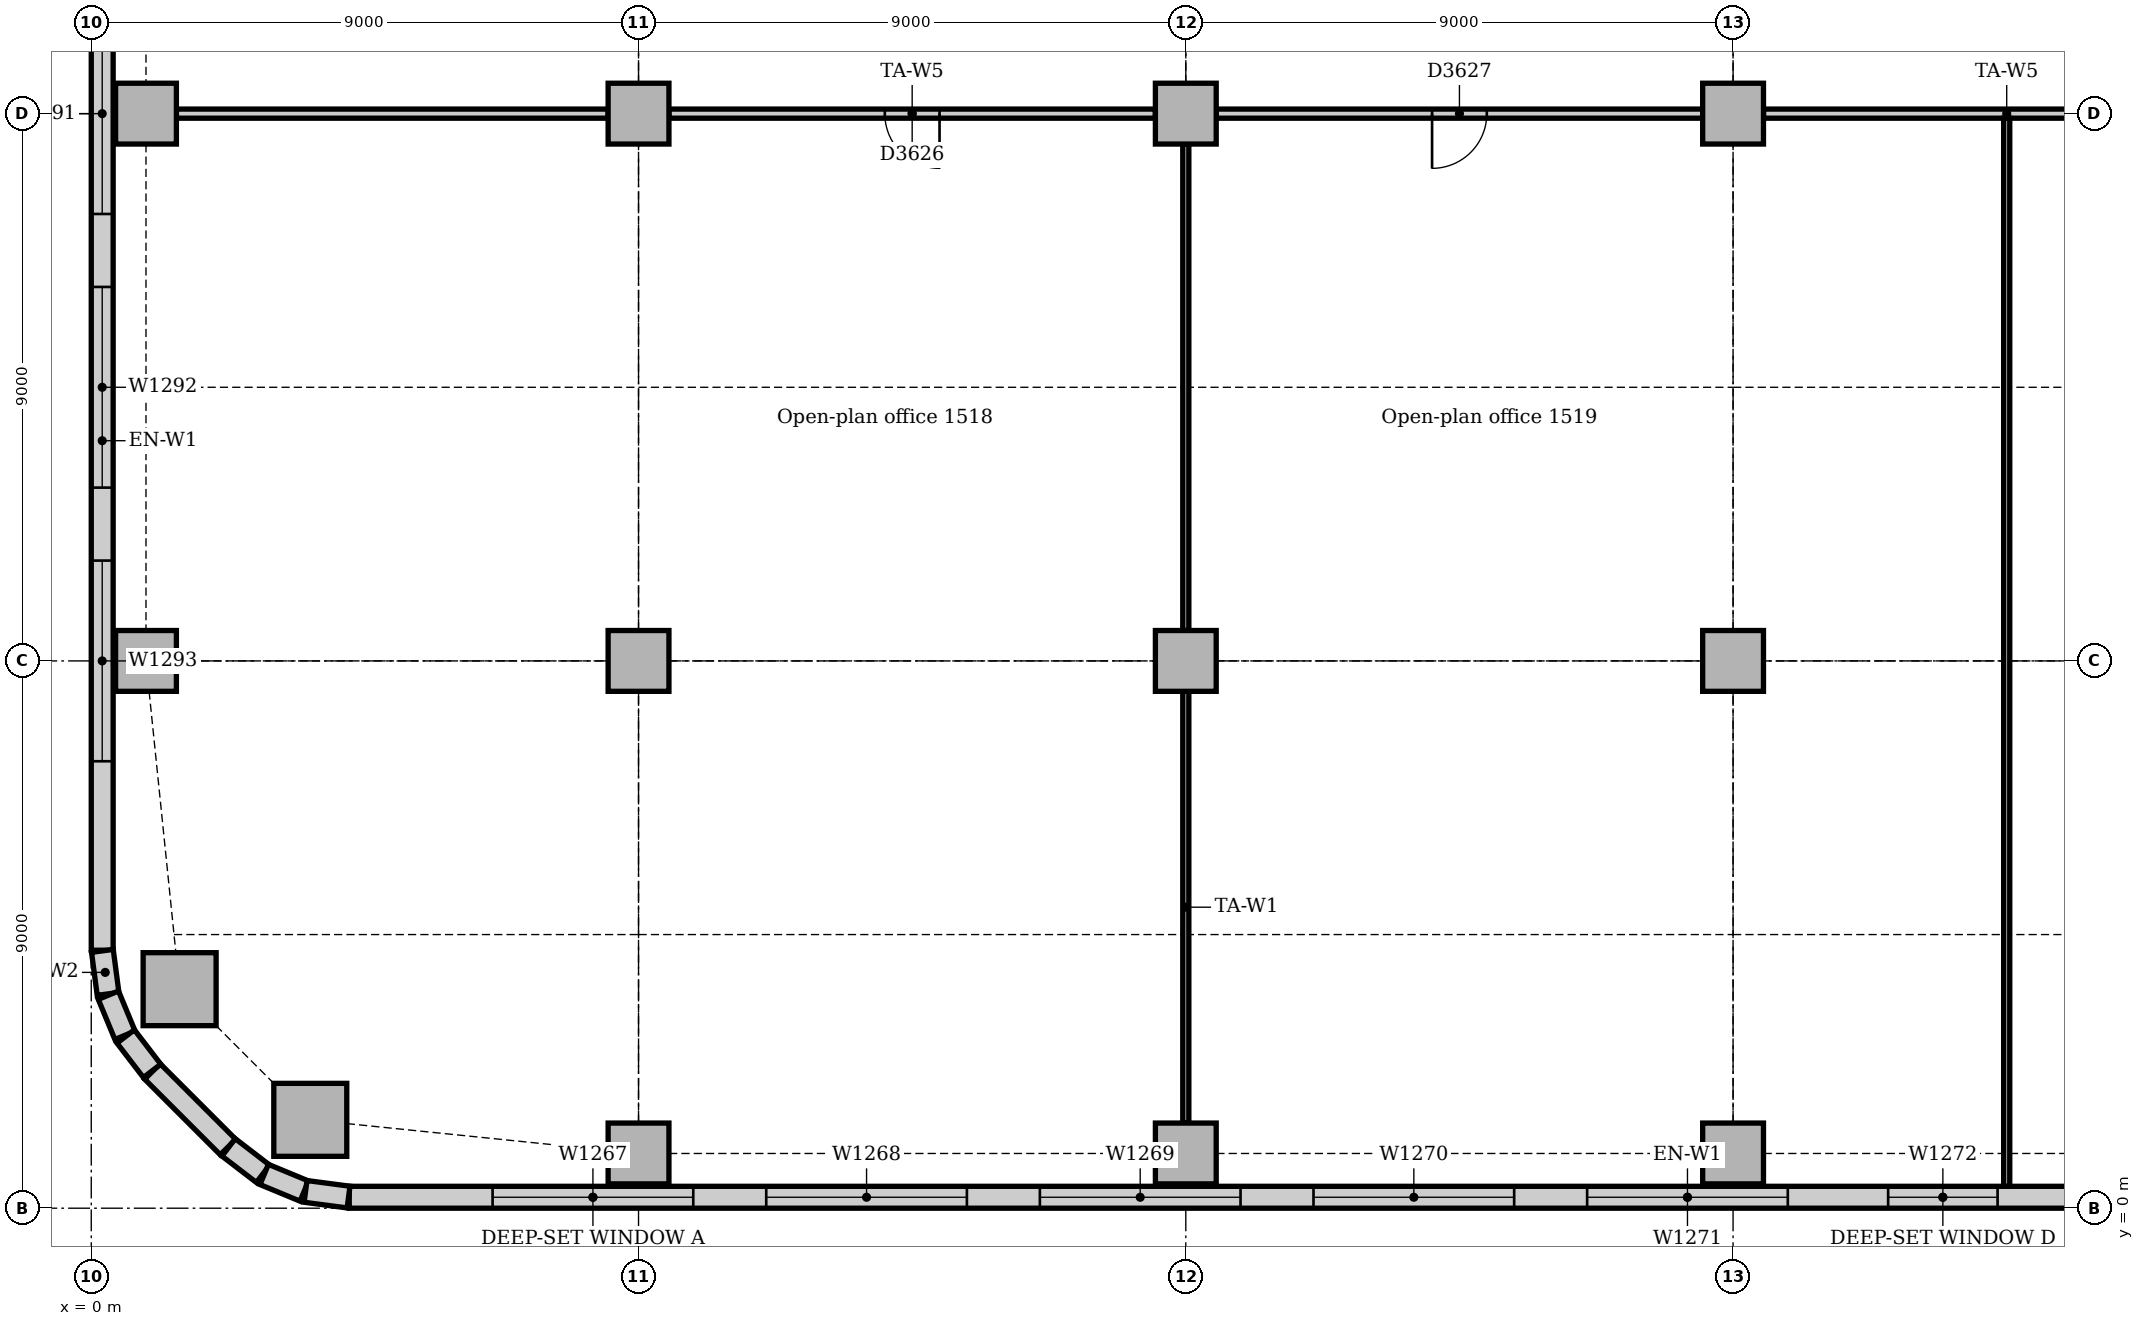
"""IFC4 building model, lengths in metres.
Left out: names, types, materials, properties, quantities, classifications, styles, units other than length and angle.
Written with IfcOpenShell. Run it as: python <this file> out.ifc"""

import sys

from ifc_helpers import new_model, si_unit, direction, frame, frame_2d, origin, origin_2d, place, context, subcontext, project, spatial, rectangle, extrude, element, fill, save


model = new_model("IFC4")
c1 = context("Model", 3, precision=1e-05, world=origin(), true_north=direction((0.0, 1.0)))
c2 = subcontext(c1, "Body", "Model", "MODEL_VIEW")
j1 = project(units=[si_unit("LENGTHUNIT", "METRE"), si_unit("PLANEANGLEUNIT", "RADIAN")], contexts=[c1])
p1 = place(None, origin())
s1 = spatial("IfcSite", under=j1, at=p1, CompositionType="ELEMENT")
p2 = place(p1, origin())
s2 = spatial("IfcBuilding", under=s1, at=p2, CompositionType="ELEMENT")
p3 = place(p2, frame((0.0, 0.0, 67.0)))
s3 = spatial("IfcBuildingStorey", under=s2, at=p3, CompositionType="ELEMENT", Elevation=67.0)
for number, where, z_axis, x_axis in (
    (1, (3.602, 1.453, 0.0), (0.0, 0.0, 1.0), (1.0, 0.0, 0.0)),
    (2, (1.453, 3.602, 0.0), (0.0, 0.0, 1.0), (1.0, 0.0, 0.0)),
):
    element("IfcColumn", number, at=place(p3, frame(where, z_axis=z_axis, x_axis=x_axis)), inside=s3, PredefinedType="COLUMN", context=c2, shape_type="SweptSolid", body=[
        extrude(rectangle(XDim=1.2, YDim=1.2, at=origin_2d()), origin(), (0.0, 0.0, 1.0), 3.85),
    ])
for number, where, z_axis, x_axis in (
    (3, (9.0, 0.9, 0.0), (0.0, 0.0, 1.0), (1.0, 0.0, 0.0)),
    (4, (18.0, 0.9, 0.0), (0.0, 0.0, 1.0), (1.0, 0.0, 0.0)),
    (5, (27.0, 0.9, 0.0), (0.0, 0.0, 1.0), (1.0, 0.0, 0.0)),
    (6, (0.9, 9.0, 0.0), (0.0, 0.0, 1.0), (1.0, 0.0, 0.0)),
    (7, (0.9, 18.0, 0.0), (0.0, 0.0, 1.0), (1.0, 0.0, 0.0)),
    (8, (9.0, 9.0, 0.0), (0.0, 0.0, 1.0), (1.0, 0.0, 0.0)),
    (9, (9.0, 18.0, 0.0), (0.0, 0.0, 1.0), (1.0, 0.0, 0.0)),
    (10, (18.0, 9.0, 0.0), (0.0, 0.0, 1.0), (1.0, 0.0, 0.0)),
    (11, (18.0, 18.0, 0.0), (0.0, 0.0, 1.0), (1.0, 0.0, 0.0)),
    (12, (27.0, 9.0, 0.0), (0.0, 0.0, 1.0), (1.0, 0.0, 0.0)),
    (13, (27.0, 18.0, 0.0), (0.0, 0.0, 1.0), (1.0, 0.0, 0.0)),
):
    element("IfcColumn", number, at=place(p3, frame(where, z_axis=z_axis, x_axis=x_axis)), inside=s3, PredefinedType="COLUMN", context=c2, shape_type="SweptSolid", body=[
        extrude(rectangle(XDim=1.0, YDim=1.0, at=origin_2d()), origin(), (0.0, 0.0, 1.0), 3.85),
    ])
p4 = place(p3, frame((4.243, 0.18, 0.0), z_axis=(0.0, 0.0, 1.0), x_axis=(1.0, 0.0, 0.0)))
e14 = element("IfcWall", 14, at=p4, inside=s3, PredefinedType="STANDARD", context=c2, shape_type="SweptSolid", body=[
    extrude(rectangle(XDim=44.015, YDim=0.36, at=frame_2d((22.007, 0.0))), origin(), (0.0, 0.0, 1.0), 3.85),
])
p5 = place(p4, frame((2.357, 0.0, 0.9)))
e15 = element("IfcOpeningElement", 15, at=p5, cuts=e14, PredefinedType="OPENING", context=c2, shape_type="SweptSolid", body=[
    extrude(rectangle(XDim=3.3, YDim=1.6, at=frame_2d((1.65, 0.8))), frame((0.0, 0.19, 0.0), z_axis=(0.0, -1.0, 0.0), x_axis=(1.0, 0.0, 0.0)), (0.0, 0.0, 1.0), 0.38),
])
p6 = place(p4, frame((6.857, 0.0, 0.9)))
e16 = element("IfcOpeningElement", 16, at=p6, cuts=e14, PredefinedType="OPENING", context=c2, shape_type="SweptSolid", body=[
    extrude(rectangle(XDim=3.3, YDim=1.6, at=frame_2d((1.65, 0.8))), frame((0.0, 0.19, 0.0), z_axis=(0.0, -1.0, 0.0), x_axis=(1.0, 0.0, 0.0)), (0.0, 0.0, 1.0), 0.38),
])
p7 = place(p4, frame((11.357, 0.0, 0.9)))
e17 = element("IfcOpeningElement", 17, at=p7, cuts=e14, PredefinedType="OPENING", context=c2, shape_type="SweptSolid", body=[
    extrude(rectangle(XDim=3.3, YDim=1.6, at=frame_2d((1.65, 0.8))), frame((0.0, 0.19, 0.0), z_axis=(0.0, -1.0, 0.0), x_axis=(1.0, 0.0, 0.0)), (0.0, 0.0, 1.0), 0.38),
])
p8 = place(p4, frame((15.857, 0.0, 0.9)))
e18 = element("IfcOpeningElement", 18, at=p8, cuts=e14, PredefinedType="OPENING", context=c2, shape_type="SweptSolid", body=[
    extrude(rectangle(XDim=3.3, YDim=1.6, at=frame_2d((1.65, 0.8))), frame((0.0, 0.19, 0.0), z_axis=(0.0, -1.0, 0.0), x_axis=(1.0, 0.0, 0.0)), (0.0, 0.0, 1.0), 0.38),
])
p9 = place(p4, frame((20.357, 0.0, 0.9)))
e19 = element("IfcOpeningElement", 19, at=p9, cuts=e14, PredefinedType="OPENING", context=c2, shape_type="SweptSolid", body=[
    extrude(rectangle(XDim=3.3, YDim=1.6, at=frame_2d((1.65, 0.8))), frame((0.0, 0.19, 0.0), z_axis=(0.0, -1.0, 0.0), x_axis=(1.0, 0.0, 0.0)), (0.0, 0.0, 1.0), 0.38),
])
p10 = place(p4, frame((25.307, 0.0, 0.9)))
e20 = element("IfcOpeningElement", 20, at=p10, cuts=e14, PredefinedType="OPENING", context=c2, shape_type="SweptSolid", body=[
    extrude(rectangle(XDim=1.8, YDim=1.6, at=frame_2d((0.9, 0.8))), frame((0.0, 0.19, 0.0), z_axis=(0.0, -1.0, 0.0), x_axis=(1.0, 0.0, 0.0)), (0.0, 0.0, 1.0), 0.38),
])
p11 = place(p4, frame((29.357, 0.0, 0.9)))
e21 = element("IfcOpeningElement", 21, at=p11, cuts=e14, PredefinedType="OPENING", context=c2, shape_type="SweptSolid", body=[
    extrude(rectangle(XDim=3.3, YDim=1.6, at=frame_2d((1.65, 0.8))), frame((0.0, 0.19, 0.0), z_axis=(0.0, -1.0, 0.0), x_axis=(1.0, 0.0, 0.0)), (0.0, 0.0, 1.0), 0.38),
])
p12 = place(p4, frame((33.857, 0.0, 0.9)))
e22 = element("IfcOpeningElement", 22, at=p12, cuts=e14, PredefinedType="OPENING", context=c2, shape_type="SweptSolid", body=[
    extrude(rectangle(XDim=3.3, YDim=1.6, at=frame_2d((1.65, 0.8))), frame((0.0, 0.19, 0.0), z_axis=(0.0, -1.0, 0.0), x_axis=(1.0, 0.0, 0.0)), (0.0, 0.0, 1.0), 0.38),
])
p13 = place(p4, frame((38.357, 0.0, 0.9)))
e23 = element("IfcOpeningElement", 23, at=p13, cuts=e14, PredefinedType="OPENING", context=c2, shape_type="SweptSolid", body=[
    extrude(rectangle(XDim=3.3, YDim=1.6, at=frame_2d((1.65, 0.8))), frame((0.0, 0.19, 0.0), z_axis=(0.0, -1.0, 0.0), x_axis=(1.0, 0.0, 0.0)), (0.0, 0.0, 1.0), 0.38),
])
p14 = place(p3, frame((0.18, 21.0, 0.0), z_axis=(0.0, 0.0, 1.0), x_axis=(0.0, -1.0, 0.0)))
e24 = element("IfcWall", 24, at=p14, inside=s3, PredefinedType="STANDARD", context=c2, shape_type="SweptSolid", body=[
    extrude(rectangle(XDim=16.757, YDim=0.36, at=frame_2d((8.379, 0.0))), origin(), (0.0, 0.0, 1.0), 3.85),
])
p15 = place(p14, frame((1.35, 0.0, 0.9)))
e25 = element("IfcOpeningElement", 25, at=p15, cuts=e24, PredefinedType="OPENING", context=c2, shape_type="SweptSolid", body=[
    extrude(rectangle(XDim=3.3, YDim=1.6, at=frame_2d((1.65, 0.8))), frame((0.0, 0.19, 0.0), z_axis=(0.0, -1.0, 0.0), x_axis=(1.0, 0.0, 0.0)), (0.0, 0.0, 1.0), 0.38),
])
p16 = place(p14, frame((5.85, 0.0, 0.9)))
e26 = element("IfcOpeningElement", 26, at=p16, cuts=e24, PredefinedType="OPENING", context=c2, shape_type="SweptSolid", body=[
    extrude(rectangle(XDim=3.3, YDim=1.6, at=frame_2d((1.65, 0.8))), frame((0.0, 0.19, 0.0), z_axis=(0.0, -1.0, 0.0), x_axis=(1.0, 0.0, 0.0)), (0.0, 0.0, 1.0), 0.38),
])
p17 = place(p14, frame((10.35, 0.0, 0.9)))
e27 = element("IfcOpeningElement", 27, at=p17, cuts=e24, PredefinedType="OPENING", context=c2, shape_type="SweptSolid", body=[
    extrude(rectangle(XDim=3.3, YDim=1.6, at=frame_2d((1.65, 0.8))), frame((0.0, 0.19, 0.0), z_axis=(0.0, -1.0, 0.0), x_axis=(1.0, 0.0, 0.0)), (0.0, 0.0, 1.0), 0.38),
])
p18 = place(p3, frame((1.006, 2.249, 0.0), z_axis=(0.0, 0.0, 1.0), x_axis=(0.707106781187, -0.707106781187, 0.0)))
e28 = element("IfcWall", 28, at=p18, inside=s3, PredefinedType="STANDARD", context=c2, shape_type="SweptSolid", body=[
    extrude(rectangle(XDim=1.757, YDim=0.36, at=frame_2d((0.879, 0.0))), origin(), (0.0, 0.0, 1.0), 3.85),
])
for number, where, z_axis, x_axis in (
    (29, (0.183, 4.231, 0.0), (0.0, 0.0, 1.0), (0.131, -0.991, 0.0)),
    (30, (0.282, 3.503, 0.0), (0.0, 0.0, 1.0), (0.383, -0.924, 0.0)),
):
    element("IfcWall", number, at=place(p3, frame(where, z_axis=z_axis, x_axis=x_axis)), inside=s3, PredefinedType="STANDARD", context=c2, shape_type="SweptSolid", body=[
        extrude(rectangle(XDim=0.713, YDim=0.36, at=frame_2d((0.356, 0.0))), origin(), (0.0, 0.0, 1.0), 3.85),
    ])
for number, where, z_axis, x_axis in (
    (31, (0.566, 2.825, 0.0), (0.0, 0.0, 1.0), (0.609, -0.793, 0.0)),
    (32, (2.259, 1.0, 0.0), (0.0, 0.0, 1.0), (0.793, -0.609, 0.0)),
):
    element("IfcWall", number, at=place(p3, frame(where, z_axis=z_axis, x_axis=x_axis)), inside=s3, PredefinedType="STANDARD", context=c2, shape_type="SweptSolid", body=[
        extrude(rectangle(XDim=0.713, YDim=0.36, at=frame_2d((0.357, 0.0))), origin(), (0.0, 0.0, 1.0), 3.85),
    ])
for number, where, z_axis, x_axis in (
    (33, (2.844, 0.555, 0.0), (0.0, 0.0, 1.0), (0.924, -0.383, 0.0)),
    (34, (3.524, 0.276, 0.0), (0.0, 0.0, 1.0), (0.991, -0.131, 0.0)),
):
    element("IfcWall", number, at=place(p3, frame(where, z_axis=z_axis, x_axis=x_axis)), inside=s3, PredefinedType="STANDARD", context=c2, shape_type="SweptSolid", body=[
        extrude(rectangle(XDim=0.713, YDim=0.36, at=frame_2d((0.356, 0.0))), origin(), (0.0, 0.0, 1.0), 3.85),
    ])
p19 = place(p3, frame((27.5, 18.0, 0.0), z_axis=(0.0, 0.0, 1.0), x_axis=(1.0, 0.0, 0.0)))
e35 = element("IfcWall", 35, at=p19, inside=s3, PredefinedType="PARTITIONING", context=c2, shape_type="SweptSolid", body=[
    extrude(rectangle(XDim=8.0, YDim=0.15, at=frame_2d((4.0, 0.0))), origin(), (0.0, 0.0, 1.0), 3.15),
])
p20 = place(p3, frame((18.5, 18.0, 0.0), z_axis=(0.0, 0.0, 1.0), x_axis=(1.0, 0.0, 0.0)))
e36 = element("IfcWall", 36, at=p20, inside=s3, PredefinedType="PARTITIONING", context=c2, shape_type="SweptSolid", body=[
    extrude(rectangle(XDim=8.0, YDim=0.15, at=frame_2d((4.0, 0.0))), origin(), (0.0, 0.0, 1.0), 3.15),
])
p21 = place(p20, frame((3.55, 0.0, 0.0)))
e37 = element("IfcOpeningElement", 37, at=p21, cuts=e36, PredefinedType="OPENING", context=c2, shape_type="SweptSolid", body=[
    extrude(rectangle(XDim=0.9, YDim=2.1, at=frame_2d((0.45, 1.05))), frame((0.0, 0.085, 0.0), z_axis=(0.0, -1.0, 0.0), x_axis=(1.0, 0.0, 0.0)), (0.0, 0.0, 1.0), 0.17),
])
p22 = place(p3, frame((9.5, 18.0, 0.0), z_axis=(0.0, 0.0, 1.0), x_axis=(1.0, 0.0, 0.0)))
e38 = element("IfcWall", 38, at=p22, inside=s3, PredefinedType="PARTITIONING", context=c2, shape_type="SweptSolid", body=[
    extrude(rectangle(XDim=8.0, YDim=0.15, at=frame_2d((4.0, 0.0))), origin(), (0.0, 0.0, 1.0), 3.15),
])
p23 = place(p22, frame((3.55, 0.0, 0.0)))
e39 = element("IfcOpeningElement", 39, at=p23, cuts=e38, PredefinedType="OPENING", context=c2, shape_type="SweptSolid", body=[
    extrude(rectangle(XDim=0.9, YDim=2.1, at=frame_2d((0.45, 1.05))), frame((0.0, 0.085, 0.0), z_axis=(0.0, -1.0, 0.0), x_axis=(1.0, 0.0, 0.0)), (0.0, 0.0, 1.0), 0.17),
])
p24 = place(p3, frame((1.4, 18.0, 0.0), z_axis=(0.0, 0.0, 1.0), x_axis=(1.0, 0.0, 0.0)))
e40 = element("IfcWall", 40, at=p24, inside=s3, PredefinedType="PARTITIONING", context=c2, shape_type="SweptSolid", body=[
    extrude(rectangle(XDim=7.1, YDim=0.15, at=frame_2d((3.55, 0.0))), origin(), (0.0, 0.0, 1.0), 3.15),
])
p25 = place(p3, frame((18.0, 1.4, 0.0), z_axis=(0.0, 0.0, 1.0), x_axis=(0.0, 1.0, 0.0)))
e41 = element("IfcWall", 41, at=p25, inside=s3, PredefinedType="PARTITIONING", context=c2, shape_type="SweptSolid", body=[
    extrude(rectangle(XDim=7.1, YDim=0.1, at=frame_2d((3.55, 0.0))), origin(), (0.0, 0.0, 1.0), 3.158),
])
p26 = place(p3, frame((18.0, 9.5, 0.0), z_axis=(0.0, 0.0, 1.0), x_axis=(0.0, 1.0, 0.0)))
e42 = element("IfcWall", 42, at=p26, inside=s3, PredefinedType="PARTITIONING", context=c2, shape_type="SweptSolid", body=[
    extrude(rectangle(XDim=8.0, YDim=0.1, at=frame_2d((4.0, 0.0))), origin(), (0.0, 0.0, 1.0), 3.158),
])
p27 = place(p3, frame((31.5, 0.36, 0.0), z_axis=(0.0, 0.0, 1.0), x_axis=(0.0, 1.0, 0.0)))
e43 = element("IfcWall", 43, at=p27, inside=s3, PredefinedType="PARTITIONING", context=c2, shape_type="SweptSolid", body=[
    extrude(rectangle(XDim=17.565, YDim=0.1, at=frame_2d((8.783, 0.0))), origin(), (0.0, 0.0, 1.0), 3.85),
])
p28 = place(p5, origin())
e44 = element("IfcWindow", 44, at=p28, inside=s3, PartitioningType="SINGLE_PANEL", PredefinedType="WINDOW", context=c2, shape_type="SweptSolid", body=[
    extrude(rectangle(XDim=3.3, YDim=1.6, at=frame_2d((1.65, 0.8))), frame((0.0, 0.13, 0.0), z_axis=(0.0, -1.0, 0.0), x_axis=(1.0, 0.0, 0.0)), (0.0, 0.0, 1.0), 0.06),
])
fill(e15, e44)
p29 = place(p6, origin())
e45 = element("IfcWindow", 45, at=p29, inside=s3, PartitioningType="SINGLE_PANEL", PredefinedType="WINDOW", context=c2, shape_type="SweptSolid", body=[
    extrude(rectangle(XDim=3.3, YDim=1.6, at=frame_2d((1.65, 0.8))), frame((0.0, 0.13, 0.0), z_axis=(0.0, -1.0, 0.0), x_axis=(1.0, 0.0, 0.0)), (0.0, 0.0, 1.0), 0.06),
])
fill(e16, e45)
p30 = place(p7, origin())
e46 = element("IfcWindow", 46, at=p30, inside=s3, PartitioningType="SINGLE_PANEL", PredefinedType="WINDOW", context=c2, shape_type="SweptSolid", body=[
    extrude(rectangle(XDim=3.3, YDim=1.6, at=frame_2d((1.65, 0.8))), frame((0.0, 0.13, 0.0), z_axis=(0.0, -1.0, 0.0), x_axis=(1.0, 0.0, 0.0)), (0.0, 0.0, 1.0), 0.06),
])
fill(e17, e46)
p31 = place(p8, origin())
e47 = element("IfcWindow", 47, at=p31, inside=s3, PartitioningType="SINGLE_PANEL", PredefinedType="WINDOW", context=c2, shape_type="SweptSolid", body=[
    extrude(rectangle(XDim=3.3, YDim=1.6, at=frame_2d((1.65, 0.8))), frame((0.0, 0.13, 0.0), z_axis=(0.0, -1.0, 0.0), x_axis=(1.0, 0.0, 0.0)), (0.0, 0.0, 1.0), 0.06),
])
fill(e18, e47)
p32 = place(p9, origin())
e48 = element("IfcWindow", 48, at=p32, inside=s3, PartitioningType="SINGLE_PANEL", PredefinedType="WINDOW", context=c2, shape_type="SweptSolid", body=[
    extrude(rectangle(XDim=3.3, YDim=1.6, at=frame_2d((1.65, 0.8))), frame((0.0, 0.13, 0.0), z_axis=(0.0, -1.0, 0.0), x_axis=(1.0, 0.0, 0.0)), (0.0, 0.0, 1.0), 0.06),
])
fill(e19, e48)
p33 = place(p10, origin())
e49 = element("IfcWindow", 49, at=p33, inside=s3, PartitioningType="SINGLE_PANEL", PredefinedType="WINDOW", context=c2, shape_type="SweptSolid", body=[
    extrude(rectangle(XDim=1.8, YDim=1.6, at=frame_2d((0.9, 0.8))), frame((0.0, 0.13, 0.0), z_axis=(0.0, -1.0, 0.0), x_axis=(1.0, 0.0, 0.0)), (0.0, 0.0, 1.0), 0.06),
])
fill(e20, e49)
p34 = place(p15, origin())
e50 = element("IfcWindow", 50, at=p34, inside=s3, PartitioningType="SINGLE_PANEL", PredefinedType="WINDOW", context=c2, shape_type="SweptSolid", body=[
    extrude(rectangle(XDim=3.3, YDim=1.6, at=frame_2d((1.65, 0.8))), frame((0.0, 0.13, 0.0), z_axis=(0.0, -1.0, 0.0), x_axis=(1.0, 0.0, 0.0)), (0.0, 0.0, 1.0), 0.06),
])
fill(e25, e50)
p35 = place(p16, origin())
e51 = element("IfcWindow", 51, at=p35, inside=s3, PartitioningType="SINGLE_PANEL", PredefinedType="WINDOW", context=c2, shape_type="SweptSolid", body=[
    extrude(rectangle(XDim=3.3, YDim=1.6, at=frame_2d((1.65, 0.8))), frame((0.0, 0.13, 0.0), z_axis=(0.0, -1.0, 0.0), x_axis=(1.0, 0.0, 0.0)), (0.0, 0.0, 1.0), 0.06),
])
fill(e26, e51)
p36 = place(p17, origin())
e52 = element("IfcWindow", 52, at=p36, inside=s3, PartitioningType="SINGLE_PANEL", PredefinedType="WINDOW", context=c2, shape_type="SweptSolid", body=[
    extrude(rectangle(XDim=3.3, YDim=1.6, at=frame_2d((1.65, 0.8))), frame((0.0, 0.13, 0.0), z_axis=(0.0, -1.0, 0.0), x_axis=(1.0, 0.0, 0.0)), (0.0, 0.0, 1.0), 0.06),
])
fill(e27, e52)
p37 = place(p23, frame((0.9, 0.0, 0.0), z_axis=(0.0, 0.0, 1.0), x_axis=(-1.0, 0.0, 0.0)))
e53 = element("IfcDoor", 53, at=p37, inside=s3, OperationType="SINGLE_SWING_LEFT", PredefinedType="DOOR", context=c2, shape_type="SweptSolid", body=[
    extrude(rectangle(XDim=0.9, YDim=2.1, at=frame_2d((0.45, 1.05))), frame((0.0, 0.025, 0.0), z_axis=(0.0, -1.0, 0.0), x_axis=(1.0, 0.0, 0.0)), (0.0, 0.0, 1.0), 0.05),
])
fill(e39, e53)
p38 = place(p21, frame((0.9, 0.0, 0.0), z_axis=(0.0, 0.0, 1.0), x_axis=(-1.0, 0.0, 0.0)))
e54 = element("IfcDoor", 54, at=p38, inside=s3, OperationType="SINGLE_SWING_RIGHT", PredefinedType="DOOR", context=c2, shape_type="SweptSolid", body=[
    extrude(rectangle(XDim=0.9, YDim=2.1, at=frame_2d((0.45, 1.05))), frame((0.0, 0.025, 0.0), z_axis=(0.0, -1.0, 0.0), x_axis=(1.0, 0.0, 0.0)), (0.0, 0.0, 1.0), 0.05),
])
fill(e37, e54)
save(model, sys.argv[1])
